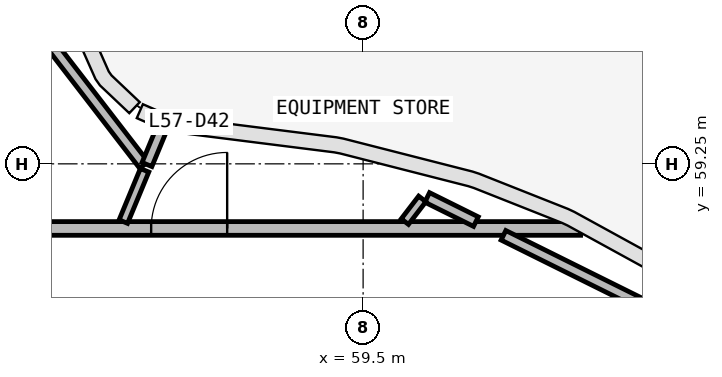
"""IFC4 building model, lengths in metres.
Left out: names, types, materials, properties, quantities, classifications, styles, units other than length and angle.
Written with IfcOpenShell. Run it as: python <this file> out.ifc"""

import sys

from ifc_helpers import new_model, si_unit, direction, frame, frame_2d, origin, place, context, subcontext, project, spatial, rectangle, extrude, source, transform, mapped, element, fill, save


model = new_model("IFC4")
c1 = context("Model", 3, precision=1e-05, world=origin(), true_north=direction((0.0, 1.0)))
c2 = subcontext(c1, "Body", "Model", "MODEL_VIEW")
j1 = project(units=[si_unit("LENGTHUNIT", "METRE"), si_unit("PLANEANGLEUNIT", "RADIAN")], contexts=[c1])
p1 = place(None, origin())
s1 = spatial("IfcSite", under=j1, at=p1, CompositionType="ELEMENT")
p2 = place(p1, origin())
s2 = spatial("IfcBuilding", under=s1, at=p2, CompositionType="ELEMENT")
p3 = place(p2, frame((0.0, 0.0, 234.5)))
s3 = spatial("IfcBuildingStorey", under=s2, at=p3, CompositionType="ELEMENT", Elevation=234.5)
p4 = place(p3, frame((40.6, 58.4, 0.0), z_axis=(0.0, 0.0, 1.0), x_axis=(1.0, 0.0, 0.0)))
e1 = element("IfcWall", 1, at=p4, inside=s3, PredefinedType="PARTITIONING", context=c2, shape_type="SweptSolid", body=[
    extrude(rectangle(XDim=21.761, YDim=0.18, at=frame_2d((10.881, 0.0))), origin(), (0.0, 0.0, 1.0), 2.88),
])
p5 = place(p4, frame((13.011, 0.0, 0.0)))
e2 = element("IfcOpeningElement", 2, at=p5, cuts=e1, PredefinedType="OPENING", context=c2, shape_type="SweptSolid", body=[
    extrude(rectangle(XDim=0.9, YDim=2.1, at=frame_2d((0.45, 1.05))), frame((0.0, 0.1, 0.0), z_axis=(0.0, -1.0, 0.0), x_axis=(1.0, 0.0, 0.0)), (0.0, 0.0, 1.0), 0.2),
])
p6 = place(p4, frame((10.411, 0.0, 0.0)))
e3 = element("IfcOpeningElement", 3, at=p6, cuts=e1, PredefinedType="OPENING", context=c2, shape_type="SweptSolid", body=[
    extrude(rectangle(XDim=0.9, YDim=2.1, at=frame_2d((0.45, 1.05))), frame((0.0, 0.1, 0.0), z_axis=(0.0, -1.0, 0.0), x_axis=(1.0, 0.0, 0.0)), (0.0, 0.0, 1.0), 0.2),
])
p7 = place(p4, frame((8.711, 0.0, 0.0)))
e4 = element("IfcOpeningElement", 4, at=p7, cuts=e1, PredefinedType="OPENING", context=c2, shape_type="SweptSolid", body=[
    extrude(rectangle(XDim=1.0, YDim=2.1, at=frame_2d((0.5, 1.05))), frame((0.0, 0.1, 0.0), z_axis=(0.0, -1.0, 0.0), x_axis=(1.0, 0.0, 0.0)), (0.0, 0.0, 1.0), 0.2),
])
p8 = place(p4, frame((16.111, 0.0, 0.0)))
e5 = element("IfcOpeningElement", 5, at=p8, cuts=e1, PredefinedType="OPENING", context=c2, shape_type="SweptSolid", body=[
    extrude(rectangle(XDim=1.0, YDim=2.1, at=frame_2d((0.5, 1.05))), frame((0.0, 0.1, 0.0), z_axis=(0.0, -1.0, 0.0), x_axis=(1.0, 0.0, 0.0)), (0.0, 0.0, 1.0), 0.2),
])
p9 = place(p3, frame((56.616, 59.234, 0.0), z_axis=(0.0, 0.0, 1.0), x_axis=(-0.610799466813, 0.791785331603, 0.0)))
e6 = element("IfcWall", 6, at=p9, inside=s3, PredefinedType="PARTITIONING", context=c2, shape_type="SweptSolid", body=[
    extrude(rectangle(XDim=4.387, YDim=0.14, at=frame_2d((2.193, 0.0))), origin(), (0.0, 0.0, 1.0), 2.88),
])
p10 = place(p3, frame((63.31, 57.335, 0.0), z_axis=(0.0, 0.0, 1.0), x_axis=(-0.895715462777, 0.444627720394, 0.0)))
e7 = element("IfcWall", 7, at=p10, inside=s3, PredefinedType="PARTITIONING", context=c2, shape_type="SweptSolid", body=[
    extrude(rectangle(XDim=2.192, YDim=0.14, at=frame_2d((1.096, 0.0))), origin(), (0.0, 0.0, 1.0), 2.88),
])
p11 = place(p3, frame((60.984, 58.49, 0.0), z_axis=(0.0, 0.0, 1.0), x_axis=(-0.895720092889, 0.444618392775, 0.0)))
e8 = element("IfcWall", 8, at=p11, inside=s3, PredefinedType="PARTITIONING", context=c2, shape_type="SweptSolid", body=[
    extrude(rectangle(XDim=0.716, YDim=0.14, at=frame_2d((0.358, 0.0))), origin(), (0.0, 0.0, 1.0), 2.88),
])
p12 = place(p3, frame((56.656, 59.241, 0.0), z_axis=(0.0, 0.0, 1.0), x_axis=(0.382646127148, 0.923894983956, 0.0)))
e9 = element("IfcWall", 9, at=p12, inside=s3, PredefinedType="PARTITIONING", context=c2, shape_type="SweptSolid", body=[
    extrude(rectangle(XDim=0.537, YDim=0.14, at=frame_2d((0.269, 0.0))), origin(), (0.0, 0.0, 1.0), 2.88),
])
p13 = place(p3, frame((56.345, 58.49, 0.0), z_axis=(0.0, 0.0, 1.0), x_axis=(0.382646687913, 0.923894751706, 0.0)))
e10 = element("IfcWall", 10, at=p13, inside=s3, PredefinedType="PARTITIONING", context=c2, shape_type="SweptSolid", body=[
    extrude(rectangle(XDim=0.731, YDim=0.12, at=frame_2d((0.366, 0.0))), origin(), (0.0, 0.0, 1.0), 2.88),
])
p14 = place(p3, frame((60.049, 58.49, 0.0), z_axis=(0.0, 0.0, 1.0), x_axis=(0.608676467498, 0.793418526324, 0.0)))
e11 = element("IfcWall", 11, at=p14, inside=s3, PredefinedType="PARTITIONING", context=c2, shape_type="SweptSolid", body=[
    extrude(rectangle(XDim=0.377, YDim=0.12, at=frame_2d((0.188, 0.0))), origin(), (0.0, 0.0, 1.0), 2.88),
])
m1 = source(origin(), c2, "Body", "SweptSolid", [
    extrude(rectangle(XDim=1.0, YDim=2.1, at=frame_2d((0.5, 1.05))), frame((0.0, 0.025, 0.0), z_axis=(0.0, -1.0, 0.0), x_axis=(1.0, 0.0, 0.0)), (0.0, 0.0, 1.0), 0.05),
])
p15 = place(p8, origin())
e12 = element("IfcDoor", 12, at=p15, inside=s3, OperationType="SINGLE_SWING_RIGHT", PredefinedType="DOOR", context=c2, shape_type="MappedRepresentation", body=[
    mapped(m1, transform((0.0, 0.0, 0.0), scale=1.0)),
])
fill(e5, e12)
save(model, sys.argv[1])
